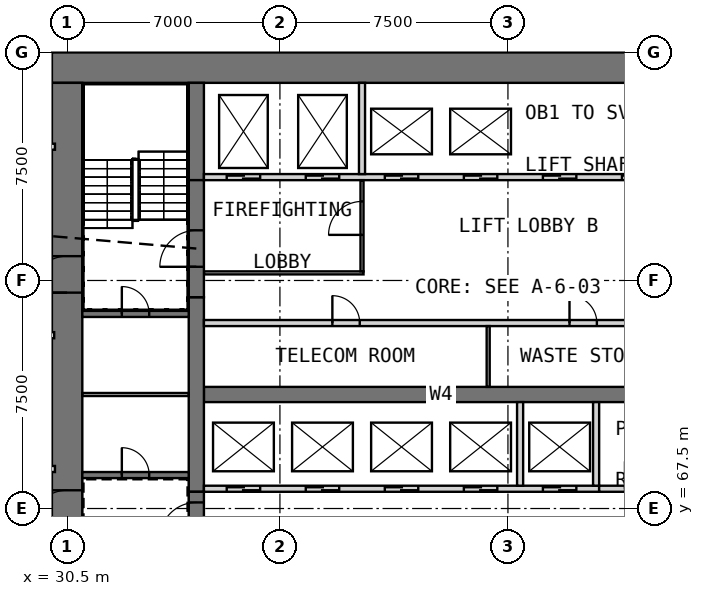
"""IFC4 building model, lengths in metres.
Left out: names, types, materials, properties, quantities, classifications, styles, units other than length and angle.
Written with IfcOpenShell. Run it as: python <this file> out.ifc"""

import sys

from ifc_helpers import new_model, si_unit, direction, frame, frame_2d, origin, place, context, subcontext, project, spatial, rectangle, extrude, element, fill, save


model = new_model("IFC4")
c1 = context("Model", 3, precision=1e-05, world=origin(), true_north=direction((0.0, 1.0)))
c2 = subcontext(c1, "Body", "Model", "MODEL_VIEW")
j1 = project(units=[si_unit("LENGTHUNIT", "METRE"), si_unit("PLANEANGLEUNIT", "RADIAN")], contexts=[c1])
p1 = place(None, origin())
s1 = spatial("IfcSite", under=j1, at=p1, CompositionType="ELEMENT")
p2 = place(p1, origin())
s2 = spatial("IfcBuilding", under=s1, at=p2, CompositionType="ELEMENT")
p3 = place(p2, origin())
s3 = spatial("IfcBuildingStorey", under=s2, at=p3, CompositionType="ELEMENT", Elevation=0.0)
p4 = place(p3, frame((30.0, 82.0, 0.0), z_axis=(0.0, 0.0, 1.0), x_axis=(1.0, 0.0, 0.0)))
e1 = element("IfcWall", 1, at=p4, inside=s3, PredefinedType="SHEAR", context=c2, shape_type="SweptSolid", body=[
    extrude(rectangle(XDim=30.0, YDim=1.0, at=frame_2d((15.0, 0.0))), origin(), (0.0, 0.0, 1.0), 8.0),
])
p5 = place(p3, frame((30.5, 61.0, 0.0), z_axis=(0.0, 0.0, 1.0), x_axis=(0.0, 1.0, 0.0)))
e2 = element("IfcWall", 2, at=p5, inside=s3, PredefinedType="SHEAR", context=c2, shape_type="SweptSolid", body=[
    extrude(rectangle(XDim=20.5, YDim=1.0, at=frame_2d((10.25, 0.0))), origin(), (0.0, 0.0, 1.0), 8.0),
])
p6 = place(p5, frame((5.9, 0.0, 0.0)))
e3 = element("IfcOpeningElement", 3, at=p6, cuts=e2, PredefinedType="OPENING", context=c2, shape_type="SweptSolid", body=[
    extrude(rectangle(XDim=1.2, YDim=2.1, at=frame_2d((0.6, 1.05))), frame((0.0, 0.51, 0.0), z_axis=(0.0, -1.0, 0.0), x_axis=(1.0, 0.0, 0.0)), (0.0, 0.0, 1.0), 1.02),
])
p7 = place(p5, frame((13.6, 0.0, 0.0)))
e4 = element("IfcOpeningElement", 4, at=p7, cuts=e2, PredefinedType="OPENING", context=c2, shape_type="SweptSolid", body=[
    extrude(rectangle(XDim=1.2, YDim=2.1, at=frame_2d((0.6, 1.05))), frame((0.0, 0.51, 0.0), z_axis=(0.0, -1.0, 0.0), x_axis=(1.0, 0.0, 0.0)), (0.0, 0.0, 1.0), 1.02),
])
p8 = place(p3, frame((35.0, 71.25, 0.0), z_axis=(0.0, 0.0, 1.0), x_axis=(1.0, 0.0, 0.0)))
e5 = element("IfcWall", 5, at=p8, inside=s3, PredefinedType="SHEAR", context=c2, shape_type="SweptSolid", body=[
    extrude(rectangle(XDim=15.6, YDim=0.5, at=frame_2d((7.8, 0.0))), origin(), (0.0, 0.0, 1.0), 8.0),
])
p9 = place(p3, frame((34.75, 68.05, 0.0), z_axis=(0.0, 0.0, 1.0), x_axis=(0.0, 1.0, 0.0)))
e6 = element("IfcWall", 6, at=p9, inside=s3, PredefinedType="SHEAR", context=c2, shape_type="SweptSolid", body=[
    extrude(rectangle(XDim=6.4, YDim=0.5, at=frame_2d((3.2, 0.0))), origin(), (0.0, 0.0, 1.0), 8.0),
])
p10 = place(p3, frame((34.75, 78.3, 0.0), z_axis=(0.0, 0.0, 1.0), x_axis=(0.0, 1.0, 0.0)))
e7 = element("IfcWall", 7, at=p10, inside=s3, PredefinedType="SHEAR", context=c2, shape_type="SweptSolid", body=[
    extrude(rectangle(XDim=3.2, YDim=0.5, at=frame_2d((1.6, 0.0))), origin(), (0.0, 0.0, 1.0), 8.0),
])
p11 = place(p3, frame((35.0, 68.15, 0.0), z_axis=(0.0, 0.0, 1.0), x_axis=(1.0, 0.0, 0.0)))
e8 = element("IfcWall", 8, at=p11, inside=s3, PredefinedType="SOLIDWALL", context=c2, shape_type="SweptSolid", body=[
    extrude(rectangle(XDim=13.0, YDim=0.2, at=frame_2d((6.5, 0.0))), origin(), (0.0, 0.0, 1.0), 8.0),
])
p12 = place(p11, frame((0.75, 0.0, 0.0)))
e9 = element("IfcOpeningElement", 9, at=p12, cuts=e8, PredefinedType="OPENING", context=c2, shape_type="SweptSolid", body=[
    extrude(rectangle(XDim=1.1, YDim=2.1, at=frame_2d((0.55, 1.05))), frame((0.0, 0.11, 0.0), z_axis=(0.0, -1.0, 0.0), x_axis=(1.0, 0.0, 0.0)), (0.0, 0.0, 1.0), 0.22),
])
p13 = place(p11, frame((3.35, 0.0, 0.0)))
e10 = element("IfcOpeningElement", 10, at=p13, cuts=e8, PredefinedType="OPENING", context=c2, shape_type="SweptSolid", body=[
    extrude(rectangle(XDim=1.1, YDim=2.1, at=frame_2d((0.55, 1.05))), frame((0.0, 0.11, 0.0), z_axis=(0.0, -1.0, 0.0), x_axis=(1.0, 0.0, 0.0)), (0.0, 0.0, 1.0), 0.22),
])
p14 = place(p11, frame((5.95, 0.0, 0.0)))
e11 = element("IfcOpeningElement", 11, at=p14, cuts=e8, PredefinedType="OPENING", context=c2, shape_type="SweptSolid", body=[
    extrude(rectangle(XDim=1.1, YDim=2.1, at=frame_2d((0.55, 1.05))), frame((0.0, 0.11, 0.0), z_axis=(0.0, -1.0, 0.0), x_axis=(1.0, 0.0, 0.0)), (0.0, 0.0, 1.0), 0.22),
])
p15 = place(p11, frame((8.55, 0.0, 0.0)))
e12 = element("IfcOpeningElement", 12, at=p15, cuts=e8, PredefinedType="OPENING", context=c2, shape_type="SweptSolid", body=[
    extrude(rectangle(XDim=1.1, YDim=2.1, at=frame_2d((0.55, 1.05))), frame((0.0, 0.11, 0.0), z_axis=(0.0, -1.0, 0.0), x_axis=(1.0, 0.0, 0.0)), (0.0, 0.0, 1.0), 0.22),
])
p16 = place(p11, frame((11.15, 0.0, 0.0)))
e13 = element("IfcOpeningElement", 13, at=p16, cuts=e8, PredefinedType="OPENING", context=c2, shape_type="SweptSolid", body=[
    extrude(rectangle(XDim=1.1, YDim=2.1, at=frame_2d((0.55, 1.05))), frame((0.0, 0.11, 0.0), z_axis=(0.0, -1.0, 0.0), x_axis=(1.0, 0.0, 0.0)), (0.0, 0.0, 1.0), 0.22),
])
for number, where, z_axis, x_axis in (
    (14, (45.4, 68.25, 0.0), (0.0, 0.0, 1.0), (0.0, 1.0, 0.0)),
    (15, (47.9, 68.25, 0.0), (0.0, 0.0, 1.0), (0.0, 1.0, 0.0)),
):
    element("IfcWall", number, at=place(p3, frame(where, z_axis=z_axis, x_axis=x_axis)), inside=s3, PredefinedType="SOLIDWALL", context=c2, shape_type="SweptSolid", body=[
        extrude(rectangle(XDim=2.75, YDim=0.2, at=frame_2d((1.375, 0.0))), origin(), (0.0, 0.0, 1.0), 8.0),
    ])
p17 = place(p3, frame((48.0, 68.15, 0.0), z_axis=(0.0, 0.0, 1.0), x_axis=(1.0, 0.0, 0.0)))
e16 = element("IfcWall", 16, at=p17, inside=s3, PredefinedType="PARTITIONING", context=c2, shape_type="SweptSolid", body=[
    extrude(rectangle(XDim=2.6, YDim=0.2, at=frame_2d((1.3, 0.0))), origin(), (0.0, 0.0, 1.0), 7.7),
])
p18 = place(p17, frame((0.85, 0.0, 0.0)))
e17 = element("IfcOpeningElement", 17, at=p18, cuts=e16, PredefinedType="OPENING", context=c2, shape_type="SweptSolid", body=[
    extrude(rectangle(XDim=0.9, YDim=2.1, at=frame_2d((0.45, 1.05))), frame((0.0, 0.11, 0.0), z_axis=(0.0, -1.0, 0.0), x_axis=(1.0, 0.0, 0.0)), (0.0, 0.0, 1.0), 0.22),
])
p19 = place(p3, frame((35.0, 73.6, 0.0), z_axis=(0.0, 0.0, 1.0), x_axis=(1.0, 0.0, 0.0)))
e18 = element("IfcWall", 18, at=p19, inside=s3, PredefinedType="PARTITIONING", context=c2, shape_type="SweptSolid", body=[
    extrude(rectangle(XDim=15.6, YDim=0.2, at=frame_2d((7.8, 0.0))), origin(), (0.0, 0.0, 1.0), 7.7),
])
p20 = place(p19, frame((4.225, 0.0, 0.0)))
e19 = element("IfcOpeningElement", 19, at=p20, cuts=e18, PredefinedType="OPENING", context=c2, shape_type="SweptSolid", body=[
    extrude(rectangle(XDim=0.9, YDim=2.1, at=frame_2d((0.45, 1.05))), frame((0.0, 0.11, 0.0), z_axis=(0.0, -1.0, 0.0), x_axis=(1.0, 0.0, 0.0)), (0.0, 0.0, 1.0), 0.22),
])
p21 = place(p19, frame((12.025, 0.0, 0.0)))
e20 = element("IfcOpeningElement", 20, at=p21, cuts=e18, PredefinedType="OPENING", context=c2, shape_type="SweptSolid", body=[
    extrude(rectangle(XDim=0.9, YDim=2.1, at=frame_2d((0.45, 1.05))), frame((0.0, 0.11, 0.0), z_axis=(0.0, -1.0, 0.0), x_axis=(1.0, 0.0, 0.0)), (0.0, 0.0, 1.0), 0.22),
])
p22 = place(p3, frame((44.35, 71.5, 0.0), z_axis=(0.0, 0.0, 1.0), x_axis=(0.0, 1.0, 0.0)))
e21 = element("IfcWall", 21, at=p22, inside=s3, PredefinedType="PARTITIONING", context=c2, shape_type="SweptSolid", body=[
    extrude(rectangle(XDim=2.0, YDim=0.1, at=frame_2d((1.0, 0.0))), origin(), (0.0, 0.0, 1.0), 7.7),
])
p23 = place(p3, frame((35.0, 78.4, 0.0), z_axis=(0.0, 0.0, 1.0), x_axis=(1.0, 0.0, 0.0)))
e22 = element("IfcWall", 22, at=p23, inside=s3, PredefinedType="SOLIDWALL", context=c2, shape_type="SweptSolid", body=[
    extrude(rectangle(XDim=15.6, YDim=0.2, at=frame_2d((7.8, 0.0))), origin(), (0.0, 0.0, 1.0), 8.0),
])
p24 = place(p23, frame((0.75, 0.0, 0.0)))
e23 = element("IfcOpeningElement", 23, at=p24, cuts=e22, PredefinedType="OPENING", context=c2, shape_type="SweptSolid", body=[
    extrude(rectangle(XDim=1.1, YDim=2.1, at=frame_2d((0.55, 1.05))), frame((0.0, 0.11, 0.0), z_axis=(0.0, -1.0, 0.0), x_axis=(1.0, 0.0, 0.0)), (0.0, 0.0, 1.0), 0.22),
])
p25 = place(p23, frame((3.35, 0.0, 0.0)))
e24 = element("IfcOpeningElement", 24, at=p25, cuts=e22, PredefinedType="OPENING", context=c2, shape_type="SweptSolid", body=[
    extrude(rectangle(XDim=1.1, YDim=2.1, at=frame_2d((0.55, 1.05))), frame((0.0, 0.11, 0.0), z_axis=(0.0, -1.0, 0.0), x_axis=(1.0, 0.0, 0.0)), (0.0, 0.0, 1.0), 0.22),
])
p26 = place(p23, frame((5.95, 0.0, 0.0)))
e25 = element("IfcOpeningElement", 25, at=p26, cuts=e22, PredefinedType="OPENING", context=c2, shape_type="SweptSolid", body=[
    extrude(rectangle(XDim=1.1, YDim=2.1, at=frame_2d((0.55, 1.05))), frame((0.0, 0.11, 0.0), z_axis=(0.0, -1.0, 0.0), x_axis=(1.0, 0.0, 0.0)), (0.0, 0.0, 1.0), 0.22),
])
p27 = place(p23, frame((8.55, 0.0, 0.0)))
e26 = element("IfcOpeningElement", 26, at=p27, cuts=e22, PredefinedType="OPENING", context=c2, shape_type="SweptSolid", body=[
    extrude(rectangle(XDim=1.1, YDim=2.1, at=frame_2d((0.55, 1.05))), frame((0.0, 0.11, 0.0), z_axis=(0.0, -1.0, 0.0), x_axis=(1.0, 0.0, 0.0)), (0.0, 0.0, 1.0), 0.22),
])
p28 = place(p23, frame((11.15, 0.0, 0.0)))
e27 = element("IfcOpeningElement", 27, at=p28, cuts=e22, PredefinedType="OPENING", context=c2, shape_type="SweptSolid", body=[
    extrude(rectangle(XDim=1.1, YDim=2.1, at=frame_2d((0.55, 1.05))), frame((0.0, 0.11, 0.0), z_axis=(0.0, -1.0, 0.0), x_axis=(1.0, 0.0, 0.0)), (0.0, 0.0, 1.0), 0.22),
])
p29 = place(p23, frame((13.75, 0.0, 0.0)))
e28 = element("IfcOpeningElement", 28, at=p29, cuts=e22, PredefinedType="OPENING", context=c2, shape_type="SweptSolid", body=[
    extrude(rectangle(XDim=1.1, YDim=2.1, at=frame_2d((0.55, 1.05))), frame((0.0, 0.11, 0.0), z_axis=(0.0, -1.0, 0.0), x_axis=(1.0, 0.0, 0.0)), (0.0, 0.0, 1.0), 0.22),
])
p30 = place(p3, frame((40.2, 78.5, 0.0), z_axis=(0.0, 0.0, 1.0), x_axis=(0.0, 1.0, 0.0)))
e29 = element("IfcWall", 29, at=p30, inside=s3, PredefinedType="SOLIDWALL", context=c2, shape_type="SweptSolid", body=[
    extrude(rectangle(XDim=3.0, YDim=0.2, at=frame_2d((1.5, 0.0))), origin(), (0.0, 0.0, 1.0), 8.0),
])
p31 = place(p3, frame((35.0, 75.25, 0.0), z_axis=(0.0, 0.0, 1.0), x_axis=(1.0, 0.0, 0.0)))
e30 = element("IfcWall", 30, at=p31, inside=s3, PredefinedType="PARTITIONING", context=c2, shape_type="SweptSolid", body=[
    extrude(rectangle(XDim=5.25, YDim=0.1, at=frame_2d((2.625, 0.0))), origin(), (0.0, 0.0, 1.0), 7.7),
])
p32 = place(p3, frame((40.2, 75.3, 0.0), z_axis=(0.0, 0.0, 1.0), x_axis=(0.0, 1.0, 0.0)))
e31 = element("IfcWall", 31, at=p32, inside=s3, PredefinedType="PARTITIONING", context=c2, shape_type="SweptSolid", body=[
    extrude(rectangle(XDim=3.0, YDim=0.1, at=frame_2d((1.5, 0.0))), origin(), (0.0, 0.0, 1.0), 7.7),
])
p33 = place(p32, frame((1.2, 0.0, 0.0)))
e32 = element("IfcOpeningElement", 32, at=p33, cuts=e31, PredefinedType="OPENING", context=c2, shape_type="SweptSolid", body=[
    extrude(rectangle(XDim=1.1, YDim=2.1, at=frame_2d((0.55, 1.05))), frame((0.0, 0.06, 0.0), z_axis=(0.0, -1.0, 0.0), x_axis=(1.0, 0.0, 0.0)), (0.0, 0.0, 1.0), 0.12),
])
p34 = place(p3, frame((34.75, 64.2, 0.0), z_axis=(0.0, 0.0, 1.0), x_axis=(0.0, 1.0, 0.0)))
e33 = element("IfcWall", 33, at=p34, inside=s3, PredefinedType="SOLIDWALL", context=c2, shape_type="SweptSolid", body=[
    extrude(rectangle(XDim=3.85, YDim=0.5, at=frame_2d((1.925, 0.0))), origin(), (0.0, 0.0, 1.0), 6.8),
])
p35 = place(p34, frame((2.3, 0.0, 0.0)))
e34 = element("IfcOpeningElement", 34, at=p35, cuts=e33, PredefinedType="OPENING", context=c2, shape_type="SweptSolid", body=[
    extrude(rectangle(XDim=1.2, YDim=2.1, at=frame_2d((0.6, 1.05))), frame((0.0, 0.26, 0.0), z_axis=(0.0, -1.0, 0.0), x_axis=(1.0, 0.0, 0.0)), (0.0, 0.0, 1.0), 0.52),
])
p36 = place(p3, frame((34.75, 74.45, 0.0), z_axis=(0.0, 0.0, 1.0), x_axis=(0.0, 1.0, 0.0)))
e35 = element("IfcWall", 35, at=p36, inside=s3, PredefinedType="SOLIDWALL", context=c2, shape_type="SweptSolid", body=[
    extrude(rectangle(XDim=3.85, YDim=0.5, at=frame_2d((1.925, 0.0))), origin(), (0.0, 0.0, 1.0), 6.8),
])
p37 = place(p36, frame((1.0, 0.0, 0.0)))
e36 = element("IfcOpeningElement", 36, at=p37, cuts=e35, PredefinedType="OPENING", context=c2, shape_type="SweptSolid", body=[
    extrude(rectangle(XDim=1.2, YDim=2.1, at=frame_2d((0.6, 1.05))), frame((0.0, 0.26, 0.0), z_axis=(0.0, -1.0, 0.0), x_axis=(1.0, 0.0, 0.0)), (0.0, 0.0, 1.0), 0.52),
])
p38 = place(p3, frame((31.0, 68.6, 0.0), z_axis=(0.0, 0.0, 1.0), x_axis=(1.0, 0.0, 0.0)))
e37 = element("IfcWall", 37, at=p38, inside=s3, PredefinedType="SOLIDWALL", context=c2, shape_type="SweptSolid", body=[
    extrude(rectangle(XDim=3.5, YDim=0.2, at=frame_2d((1.75, 0.0))), origin(), (0.0, 0.0, 1.0), 7.7),
])
p39 = place(p38, frame((1.3, 0.0, 0.0)))
e38 = element("IfcOpeningElement", 38, at=p39, cuts=e37, PredefinedType="OPENING", context=c2, shape_type="SweptSolid", body=[
    extrude(rectangle(XDim=0.9, YDim=2.1, at=frame_2d((0.45, 1.05))), frame((0.0, 0.11, 0.0), z_axis=(0.0, -1.0, 0.0), x_axis=(1.0, 0.0, 0.0)), (0.0, 0.0, 1.0), 0.22),
])
p40 = place(p3, frame((31.0, 73.9, 0.0), z_axis=(0.0, 0.0, 1.0), x_axis=(1.0, 0.0, 0.0)))
e39 = element("IfcWall", 39, at=p40, inside=s3, PredefinedType="SOLIDWALL", context=c2, shape_type="SweptSolid", body=[
    extrude(rectangle(XDim=3.5, YDim=0.2, at=frame_2d((1.75, 0.0))), origin(), (0.0, 0.0, 1.0), 7.7),
])
p41 = place(p40, frame((1.3, 0.0, 0.0)))
e40 = element("IfcOpeningElement", 40, at=p41, cuts=e39, PredefinedType="OPENING", context=c2, shape_type="SweptSolid", body=[
    extrude(rectangle(XDim=0.9, YDim=2.1, at=frame_2d((0.45, 1.05))), frame((0.0, 0.11, 0.0), z_axis=(0.0, -1.0, 0.0), x_axis=(1.0, 0.0, 0.0)), (0.0, 0.0, 1.0), 0.22),
])
p42 = place(p3, frame((31.0, 71.25, 0.0), z_axis=(0.0, 0.0, 1.0), x_axis=(1.0, 0.0, 0.0)))
e41 = element("IfcWall", 41, at=p42, inside=s3, PredefinedType="PARTITIONING", context=c2, shape_type="SweptSolid", body=[
    extrude(rectangle(XDim=3.5, YDim=0.1, at=frame_2d((1.75, 0.0))), origin(), (0.0, 0.0, 1.0), 7.7),
])
p43 = place(p3, frame((25.9, 68.8, 0.0), z_axis=(0.0, 0.0, 1.0), x_axis=(1.0, 0.0, 0.0)))
e42 = element("IfcWall", 42, at=p43, inside=s3, PredefinedType="PARTITIONING", context=c2, shape_type="SweptSolid", body=[
    extrude(rectangle(XDim=4.2, YDim=0.2, at=frame_2d((2.1, 0.0))), origin(), (0.0, 0.0, 1.0), 7.7),
])
p44 = place(p3, frame((25.9, 73.2, 0.0), z_axis=(0.0, 0.0, 1.0), x_axis=(1.0, 0.0, 0.0)))
e43 = element("IfcWall", 43, at=p44, inside=s3, PredefinedType="PARTITIONING", context=c2, shape_type="SweptSolid", body=[
    extrude(rectangle(XDim=4.175, YDim=0.2, at=frame_2d((2.087, 0.0))), origin(), (0.0, 0.0, 1.0), 7.7),
])
p45 = place(p3, frame((22.9, 79.4, 0.0), z_axis=(0.0, 0.0, 1.0), x_axis=(1.0, 0.0, 0.0)))
e44 = element("IfcWall", 44, at=p45, inside=s3, PredefinedType="PARTITIONING", context=c2, shape_type="SweptSolid", body=[
    extrude(rectangle(XDim=7.2, YDim=0.2, at=frame_2d((3.6, 0.0))), origin(), (0.0, 0.0, 1.0), 7.7),
])
p46 = place(p12, origin())
e45 = element("IfcDoor", 45, at=p46, inside=s3, OperationType="DOUBLE_DOOR_SLIDING", PredefinedType="DOOR", context=c2, shape_type="SweptSolid", body=[
    extrude(rectangle(XDim=1.1, YDim=2.1, at=frame_2d((0.55, 1.05))), frame((0.0, 0.025, 0.0), z_axis=(0.0, -1.0, 0.0), x_axis=(1.0, 0.0, 0.0)), (0.0, 0.0, 1.0), 0.05),
])
fill(e9, e45)
p47 = place(p13, origin())
e46 = element("IfcDoor", 46, at=p47, inside=s3, OperationType="DOUBLE_DOOR_SLIDING", PredefinedType="DOOR", context=c2, shape_type="SweptSolid", body=[
    extrude(rectangle(XDim=1.1, YDim=2.1, at=frame_2d((0.55, 1.05))), frame((0.0, 0.025, 0.0), z_axis=(0.0, -1.0, 0.0), x_axis=(1.0, 0.0, 0.0)), (0.0, 0.0, 1.0), 0.05),
])
fill(e10, e46)
p48 = place(p14, origin())
e47 = element("IfcDoor", 47, at=p48, inside=s3, OperationType="DOUBLE_DOOR_SLIDING", PredefinedType="DOOR", context=c2, shape_type="SweptSolid", body=[
    extrude(rectangle(XDim=1.1, YDim=2.1, at=frame_2d((0.55, 1.05))), frame((0.0, 0.025, 0.0), z_axis=(0.0, -1.0, 0.0), x_axis=(1.0, 0.0, 0.0)), (0.0, 0.0, 1.0), 0.05),
])
fill(e11, e47)
p49 = place(p15, origin())
e48 = element("IfcDoor", 48, at=p49, inside=s3, OperationType="DOUBLE_DOOR_SLIDING", PredefinedType="DOOR", context=c2, shape_type="SweptSolid", body=[
    extrude(rectangle(XDim=1.1, YDim=2.1, at=frame_2d((0.55, 1.05))), frame((0.0, 0.025, 0.0), z_axis=(0.0, -1.0, 0.0), x_axis=(1.0, 0.0, 0.0)), (0.0, 0.0, 1.0), 0.05),
])
fill(e12, e48)
p50 = place(p16, origin())
e49 = element("IfcDoor", 49, at=p50, inside=s3, OperationType="DOUBLE_DOOR_SLIDING", PredefinedType="DOOR", context=c2, shape_type="SweptSolid", body=[
    extrude(rectangle(XDim=1.1, YDim=2.1, at=frame_2d((0.55, 1.05))), frame((0.0, 0.025, 0.0), z_axis=(0.0, -1.0, 0.0), x_axis=(1.0, 0.0, 0.0)), (0.0, 0.0, 1.0), 0.05),
])
fill(e13, e49)
p51 = place(p20, origin())
e50 = element("IfcDoor", 50, at=p51, inside=s3, OperationType="SINGLE_SWING_RIGHT", PredefinedType="DOOR", context=c2, shape_type="SweptSolid", body=[
    extrude(rectangle(XDim=0.9, YDim=2.1, at=frame_2d((0.45, 1.05))), frame((0.0, 0.025, 0.0), z_axis=(0.0, -1.0, 0.0), x_axis=(1.0, 0.0, 0.0)), (0.0, 0.0, 1.0), 0.05),
])
fill(e19, e50)
p52 = place(p21, origin())
e51 = element("IfcDoor", 51, at=p52, inside=s3, OperationType="SINGLE_SWING_LEFT", PredefinedType="DOOR", context=c2, shape_type="SweptSolid", body=[
    extrude(rectangle(XDim=0.9, YDim=2.1, at=frame_2d((0.45, 1.05))), frame((0.0, 0.025, 0.0), z_axis=(0.0, -1.0, 0.0), x_axis=(1.0, 0.0, 0.0)), (0.0, 0.0, 1.0), 0.05),
])
fill(e20, e51)
p53 = place(p24, origin())
e52 = element("IfcDoor", 52, at=p53, inside=s3, OperationType="DOUBLE_DOOR_SLIDING", PredefinedType="DOOR", context=c2, shape_type="SweptSolid", body=[
    extrude(rectangle(XDim=1.1, YDim=2.1, at=frame_2d((0.55, 1.05))), frame((0.0, 0.025, 0.0), z_axis=(0.0, -1.0, 0.0), x_axis=(1.0, 0.0, 0.0)), (0.0, 0.0, 1.0), 0.05),
])
fill(e23, e52)
p54 = place(p25, origin())
e53 = element("IfcDoor", 53, at=p54, inside=s3, OperationType="DOUBLE_DOOR_SLIDING", PredefinedType="DOOR", context=c2, shape_type="SweptSolid", body=[
    extrude(rectangle(XDim=1.1, YDim=2.1, at=frame_2d((0.55, 1.05))), frame((0.0, 0.025, 0.0), z_axis=(0.0, -1.0, 0.0), x_axis=(1.0, 0.0, 0.0)), (0.0, 0.0, 1.0), 0.05),
])
fill(e24, e53)
p55 = place(p26, origin())
e54 = element("IfcDoor", 54, at=p55, inside=s3, OperationType="DOUBLE_DOOR_SLIDING", PredefinedType="DOOR", context=c2, shape_type="SweptSolid", body=[
    extrude(rectangle(XDim=1.1, YDim=2.1, at=frame_2d((0.55, 1.05))), frame((0.0, 0.025, 0.0), z_axis=(0.0, -1.0, 0.0), x_axis=(1.0, 0.0, 0.0)), (0.0, 0.0, 1.0), 0.05),
])
fill(e25, e54)
p56 = place(p27, origin())
e55 = element("IfcDoor", 55, at=p56, inside=s3, OperationType="DOUBLE_DOOR_SLIDING", PredefinedType="DOOR", context=c2, shape_type="SweptSolid", body=[
    extrude(rectangle(XDim=1.1, YDim=2.1, at=frame_2d((0.55, 1.05))), frame((0.0, 0.025, 0.0), z_axis=(0.0, -1.0, 0.0), x_axis=(1.0, 0.0, 0.0)), (0.0, 0.0, 1.0), 0.05),
])
fill(e26, e55)
p57 = place(p28, origin())
e56 = element("IfcDoor", 56, at=p57, inside=s3, OperationType="DOUBLE_DOOR_SLIDING", PredefinedType="DOOR", context=c2, shape_type="SweptSolid", body=[
    extrude(rectangle(XDim=1.1, YDim=2.1, at=frame_2d((0.55, 1.05))), frame((0.0, 0.025, 0.0), z_axis=(0.0, -1.0, 0.0), x_axis=(1.0, 0.0, 0.0)), (0.0, 0.0, 1.0), 0.05),
])
fill(e27, e56)
p58 = place(p29, origin())
e57 = element("IfcDoor", 57, at=p58, inside=s3, OperationType="DOUBLE_DOOR_SLIDING", PredefinedType="DOOR", context=c2, shape_type="SweptSolid", body=[
    extrude(rectangle(XDim=1.1, YDim=2.1, at=frame_2d((0.55, 1.05))), frame((0.0, 0.025, 0.0), z_axis=(0.0, -1.0, 0.0), x_axis=(1.0, 0.0, 0.0)), (0.0, 0.0, 1.0), 0.05),
])
fill(e28, e57)
p59 = place(p33, origin())
e58 = element("IfcDoor", 58, at=p59, inside=s3, OperationType="SINGLE_SWING_LEFT", PredefinedType="DOOR", context=c2, shape_type="SweptSolid", body=[
    extrude(rectangle(XDim=1.1, YDim=2.1, at=frame_2d((0.55, 1.05))), frame((0.0, 0.025, 0.0), z_axis=(0.0, -1.0, 0.0), x_axis=(1.0, 0.0, 0.0)), (0.0, 0.0, 1.0), 0.05),
])
fill(e32, e58)
p60 = place(p35, origin())
e59 = element("IfcDoor", 59, at=p60, inside=s3, OperationType="SINGLE_SWING_LEFT", PredefinedType="DOOR", context=c2, shape_type="SweptSolid", body=[
    extrude(rectangle(XDim=1.2, YDim=2.1, at=frame_2d((0.6, 1.05))), frame((0.0, 0.025, 0.0), z_axis=(0.0, -1.0, 0.0), x_axis=(1.0, 0.0, 0.0)), (0.0, 0.0, 1.0), 0.05),
])
fill(e34, e59)
p61 = place(p37, origin())
e60 = element("IfcDoor", 60, at=p61, inside=s3, OperationType="SINGLE_SWING_RIGHT", PredefinedType="DOOR", context=c2, shape_type="SweptSolid", body=[
    extrude(rectangle(XDim=1.2, YDim=2.1, at=frame_2d((0.6, 1.05))), frame((0.0, 0.025, 0.0), z_axis=(0.0, -1.0, 0.0), x_axis=(1.0, 0.0, 0.0)), (0.0, 0.0, 1.0), 0.05),
])
fill(e36, e60)
p62 = place(p6, origin())
e61 = element("IfcDoor", 61, at=p62, inside=s3, OperationType="SINGLE_SWING_LEFT", PredefinedType="DOOR", context=c2, shape_type="SweptSolid", body=[
    extrude(rectangle(XDim=1.2, YDim=2.1, at=frame_2d((0.6, 1.05))), frame((0.0, 0.025, 0.0), z_axis=(0.0, -1.0, 0.0), x_axis=(1.0, 0.0, 0.0)), (0.0, 0.0, 1.0), 0.05),
])
fill(e3, e61)
p63 = place(p7, origin())
e62 = element("IfcDoor", 62, at=p63, inside=s3, OperationType="SINGLE_SWING_RIGHT", PredefinedType="DOOR", context=c2, shape_type="SweptSolid", body=[
    extrude(rectangle(XDim=1.2, YDim=2.1, at=frame_2d((0.6, 1.05))), frame((0.0, 0.025, 0.0), z_axis=(0.0, -1.0, 0.0), x_axis=(1.0, 0.0, 0.0)), (0.0, 0.0, 1.0), 0.05),
])
fill(e4, e62)
p64 = place(p39, origin())
e63 = element("IfcDoor", 63, at=p64, inside=s3, OperationType="SINGLE_SWING_LEFT", PredefinedType="DOOR", context=c2, shape_type="SweptSolid", body=[
    extrude(rectangle(XDim=0.9, YDim=2.1, at=frame_2d((0.45, 1.05))), frame((0.0, 0.025, 0.0), z_axis=(0.0, -1.0, 0.0), x_axis=(1.0, 0.0, 0.0)), (0.0, 0.0, 1.0), 0.05),
])
fill(e38, e63)
p65 = place(p41, origin())
e64 = element("IfcDoor", 64, at=p65, inside=s3, OperationType="SINGLE_SWING_RIGHT", PredefinedType="DOOR", context=c2, shape_type="SweptSolid", body=[
    extrude(rectangle(XDim=0.9, YDim=2.1, at=frame_2d((0.45, 1.05))), frame((0.0, 0.025, 0.0), z_axis=(0.0, -1.0, 0.0), x_axis=(1.0, 0.0, 0.0)), (0.0, 0.0, 1.0), 0.05),
])
fill(e40, e64)
save(model, sys.argv[1])
